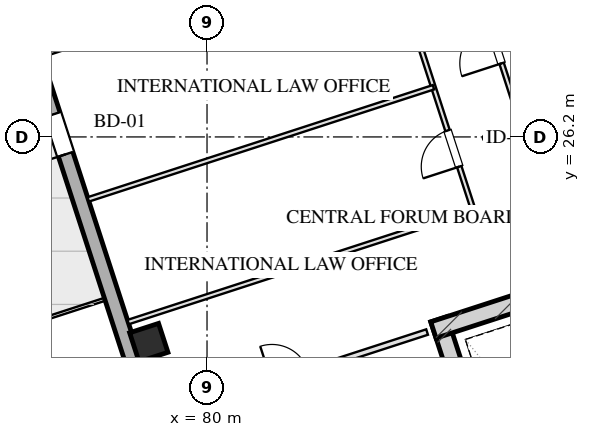
"""IFC4 building model, lengths in metres.
Left out: names, types, materials, properties, quantities, classifications, styles, units other than length and angle.
Written with IfcOpenShell. Run it as: python <this file> out.ifc"""

import sys

from ifc_helpers import new_model, si_unit, direction, frame, frame_2d, origin, origin_2d, place, context, subcontext, project, spatial, rectangle, hollow_rectangle, extrude, element, fill, save


model = new_model("IFC4")
c1 = context("Model", 3, precision=1e-05, world=origin(), true_north=direction((0.0, 1.0)))
c2 = subcontext(c1, "Body", "Model", "MODEL_VIEW")
j1 = project(units=[si_unit("LENGTHUNIT", "METRE"), si_unit("PLANEANGLEUNIT", "RADIAN")], contexts=[c1])
p1 = place(None, origin())
s1 = spatial("IfcSite", under=j1, at=p1, CompositionType="ELEMENT")
p2 = place(p1, origin())
s2 = spatial("IfcBuilding", under=s1, at=p2, CompositionType="ELEMENT")
p3 = place(p2, frame((0.0, 0.0, 188.6)))
s3 = spatial("IfcBuildingStorey", under=s2, at=p3, CompositionType="ELEMENT", Elevation=188.6)
p4 = place(p3, frame((86.102, 21.404, 0.0), z_axis=(0.0, 0.0, 1.0), x_axis=(0.309035778627, -0.951050412717, 0.0)))
e1 = element("IfcWall", 1, at=p4, inside=s3, PredefinedType="SHEAR", context=c2, shape_type="SweptSolid", body=[
    extrude(rectangle(XDim=9.33, YDim=0.45, at=frame_2d((4.665, 0.0))), origin(), (0.0, 0.0, 1.0), 3.45),
])
p5 = place(p3, frame((85.957, 21.12, 0.0), z_axis=(0.0, 0.0, 1.0), x_axis=(0.951064796122, 0.308991510526, 0.0)))
e2 = element("IfcWall", 2, at=p5, inside=s3, PredefinedType="SHEAR", context=c2, shape_type="SweptSolid", body=[
    extrude(rectangle(XDim=4.145, YDim=0.45, at=frame_2d((2.073, 0.0))), origin(), (0.0, 0.0, 1.0), 3.45),
])
p6 = place(p3, frame((78.468, 20.79, 0.0), z_axis=(0.0, 0.0, 1.0), x_axis=(0.951056516295, 0.309016994375, 0.0)))
e3 = element("IfcColumn", 3, at=p6, inside=s3, PredefinedType="COLUMN", context=c2, shape_type="SweptSolid", body=[
    extrude(hollow_rectangle(XDim=0.8, YDim=0.8, WallThickness=0.028, at=origin_2d()), origin(), (0.0, 0.0, 1.0), 3.451),
])
p7 = place(p3, frame((81.776, 8.827, 0.0), z_axis=(0.0, 0.0, 1.0), x_axis=(-0.309014228706, 0.951057414911, 0.0)))
e4 = element("IfcWall", 4, at=p7, inside=s3, PredefinedType="SOLIDWALL", context=c2, shape_type="SweptSolid", body=[
    extrude(rectangle(XDim=42.8, YDim=0.4, at=frame_2d((21.4, 0.0))), origin(), (0.0, 0.0, 1.0), 2.61),
])
p8 = place(p7, frame((22.95, 0.0, 0.75)))
e5 = element("IfcOpeningElement", 5, at=p8, cuts=e4, PredefinedType="OPENING", context=c2, shape_type="SweptSolid", body=[
    extrude(rectangle(XDim=2.1, YDim=1.46, at=frame_2d((1.05, 0.73))), frame((0.0, 0.21, 0.0), z_axis=(0.0, -1.0, 0.0), x_axis=(1.0, 0.0, 0.0)), (0.0, 0.0, 1.0), 0.42),
])
p9 = place(p7, frame((26.75, 0.0, 0.75)))
e6 = element("IfcOpeningElement", 6, at=p9, cuts=e4, PredefinedType="OPENING", context=c2, shape_type="SweptSolid", body=[
    extrude(rectangle(XDim=2.1, YDim=1.46, at=frame_2d((1.05, 0.73))), frame((0.0, 0.21, 0.0), z_axis=(0.0, -1.0, 0.0), x_axis=(1.0, 0.0, 0.0)), (0.0, 0.0, 1.0), 0.42),
])
p10 = place(p7, frame((17.787, 0.0, 0.0)))
e7 = element("IfcOpeningElement", 7, at=p10, cuts=e4, PredefinedType="OPENING", context=c2, shape_type="SweptSolid", body=[
    extrude(rectangle(XDim=1.1, YDim=2.15, at=frame_2d((0.55, 1.075))), frame((0.0, 0.21, 0.0), z_axis=(0.0, -1.0, 0.0), x_axis=(1.0, 0.0, 0.0)), (0.0, 0.0, 1.0), 0.42),
])
p11 = place(p3, frame((78.753, 18.78, 0.0), z_axis=(0.0, 0.0, 1.0), x_axis=(0.951060977215, 0.309003264738, 0.0)))
e8 = element("IfcWall", 8, at=p11, inside=s3, PredefinedType="PARTITIONING", context=c2, shape_type="SweptSolid", body=[
    extrude(rectangle(XDim=7.4, YDim=0.15, at=frame_2d((3.7, 0.0))), origin(), (0.0, 0.0, 1.0), 3.175),
])
p12 = place(p11, frame((3.108, 0.0, 0.0)))
e9 = element("IfcOpeningElement", 9, at=p12, cuts=e8, PredefinedType="OPENING", context=c2, shape_type="SweptSolid", body=[
    extrude(rectangle(XDim=1.0, YDim=2.05, at=frame_2d((0.5, 1.025))), frame((0.0, 0.085, 0.0), z_axis=(0.0, -1.0, 0.0), x_axis=(1.0, 0.0, 0.0)), (0.0, 0.0, 1.0), 0.17),
])
p13 = place(p3, frame((77.925, 21.328, 0.0), z_axis=(0.0, 0.0, 1.0), x_axis=(0.951053980838, 0.309024797601, 0.0)))
e10 = element("IfcWall", 10, at=p13, inside=s3, PredefinedType="PARTITIONING", context=c2, shape_type="SweptSolid", body=[
    extrude(rectangle(XDim=9.55, YDim=0.12, at=frame_2d((4.775, 0.0))), origin(), (0.0, 0.0, 1.0), 3.175),
])
p14 = place(p3, frame((87.007, 24.28, 0.0), z_axis=(0.0, 0.0, 1.0), x_axis=(-0.309022042254, 0.951054876125, 0.0)))
e11 = element("IfcWall", 11, at=p14, inside=s3, PredefinedType="PARTITIONING", context=c2, shape_type="SweptSolid", body=[
    extrude(rectangle(XDim=16.64, YDim=0.12, at=frame_2d((8.32, 0.0))), origin(), (0.0, 0.0, 1.0), 3.175),
])
p15 = place(p14, frame((1.197, 0.0, 0.0)))
e12 = element("IfcOpeningElement", 12, at=p15, cuts=e11, PredefinedType="OPENING", context=c2, shape_type="SweptSolid", body=[
    extrude(rectangle(XDim=1.0, YDim=2.05, at=frame_2d((0.5, 1.025))), frame((0.0, 0.07, 0.0), z_axis=(0.0, -1.0, 0.0), x_axis=(1.0, 0.0, 0.0)), (0.0, 0.0, 1.0), 0.14),
])
p16 = place(p14, frame((4.891, 0.0, 0.0)))
e13 = element("IfcOpeningElement", 13, at=p16, cuts=e11, PredefinedType="OPENING", context=c2, shape_type="SweptSolid", body=[
    extrude(rectangle(XDim=1.0, YDim=2.05, at=frame_2d((0.5, 1.025))), frame((0.0, 0.07, 0.0), z_axis=(0.0, -1.0, 0.0), x_axis=(1.0, 0.0, 0.0)), (0.0, 0.0, 1.0), 0.14),
])
p17 = place(p14, frame((9.354, 0.0, 0.0)))
e14 = element("IfcOpeningElement", 14, at=p17, cuts=e11, PredefinedType="OPENING", context=c2, shape_type="SweptSolid", body=[
    extrude(rectangle(XDim=1.0, YDim=2.05, at=frame_2d((0.5, 1.025))), frame((0.0, 0.07, 0.0), z_axis=(0.0, -1.0, 0.0), x_axis=(1.0, 0.0, 0.0)), (0.0, 0.0, 1.0), 0.14),
])
p18 = place(p14, frame((13.98, 0.0, 0.0)))
e15 = element("IfcOpeningElement", 15, at=p18, cuts=e11, PredefinedType="OPENING", context=c2, shape_type="SweptSolid", body=[
    extrude(rectangle(XDim=1.0, YDim=2.05, at=frame_2d((0.5, 1.025))), frame((0.0, 0.07, 0.0), z_axis=(0.0, -1.0, 0.0), x_axis=(1.0, 0.0, 0.0)), (0.0, 0.0, 1.0), 0.14),
])
p19 = place(p3, frame((88.814, 24.867, 0.0), z_axis=(0.0, 0.0, 1.0), x_axis=(-0.309022042254, 0.951054876125, 0.0)))
e16 = element("IfcWall", 16, at=p19, inside=s3, PredefinedType="PARTITIONING", context=c2, shape_type="SweptSolid", body=[
    extrude(rectangle(XDim=16.64, YDim=0.12, at=frame_2d((8.32, 0.0))), origin(), (0.0, 0.0, 1.0), 3.175),
])
p20 = place(p19, frame((3.438, 0.0, 0.0)))
e17 = element("IfcOpeningElement", 17, at=p20, cuts=e16, PredefinedType="OPENING", context=c2, shape_type="SweptSolid", body=[
    extrude(rectangle(XDim=1.1, YDim=2.05, at=frame_2d((0.55, 1.025))), frame((0.0, 0.07, 0.0), z_axis=(0.0, -1.0, 0.0), x_axis=(1.0, 0.0, 0.0)), (0.0, 0.0, 1.0), 0.14),
])
p21 = place(p19, frame((11.69, 0.0, 0.0)))
e18 = element("IfcOpeningElement", 18, at=p21, cuts=e16, PredefinedType="OPENING", context=c2, shape_type="SweptSolid", body=[
    extrude(rectangle(XDim=1.1, YDim=2.05, at=frame_2d((0.55, 1.025))), frame((0.0, 0.07, 0.0), z_axis=(0.0, -1.0, 0.0), x_axis=(1.0, 0.0, 0.0)), (0.0, 0.0, 1.0), 0.14),
])
p22 = place(p3, frame((76.876, 24.557, 0.0), z_axis=(0.0, 0.0, 1.0), x_axis=(0.951056422073, 0.309017284359, 0.0)))
e19 = element("IfcWall", 19, at=p22, inside=s3, PredefinedType="PARTITIONING", context=c2, shape_type="SweptSolid", body=[
    extrude(rectangle(XDim=9.55, YDim=0.12, at=frame_2d((4.775, 0.0))), origin(), (0.0, 0.0, 1.0), 3.175),
])
p23 = place(p3, frame((75.642, 28.355, 0.0), z_axis=(0.0, 0.0, 1.0), x_axis=(0.951053980838, 0.309024797601, 0.0)))
e20 = element("IfcWall", 20, at=p23, inside=s3, PredefinedType="PARTITIONING", context=c2, shape_type="SweptSolid", body=[
    extrude(rectangle(XDim=9.55, YDim=0.12, at=frame_2d((4.775, 0.0))), origin(), (0.0, 0.0, 1.0), 3.175),
])
p24 = place(p10, origin())
e21 = element("IfcDoor", 21, at=p24, inside=s3, OperationType="SINGLE_SWING_LEFT", PredefinedType="DOOR", context=c2, shape_type="SweptSolid", body=[
    extrude(rectangle(XDim=1.1, YDim=2.15, at=frame_2d((0.55, 1.075))), frame((0.0, 0.025, 0.0), z_axis=(0.0, -1.0, 0.0), x_axis=(1.0, 0.0, 0.0)), (0.0, 0.0, 1.0), 0.05),
])
fill(e7, e21)
p25 = place(p15, origin())
e22 = element("IfcDoor", 22, at=p25, inside=s3, OperationType="SINGLE_SWING_LEFT", PredefinedType="DOOR", context=c2, shape_type="SweptSolid", body=[
    extrude(rectangle(XDim=1.0, YDim=2.05, at=frame_2d((0.5, 1.025))), frame((0.0, 0.025, 0.0), z_axis=(0.0, -1.0, 0.0), x_axis=(1.0, 0.0, 0.0)), (0.0, 0.0, 1.0), 0.05),
])
fill(e12, e22)
p26 = place(p20, origin())
e23 = element("IfcDoor", 23, at=p26, inside=s3, OperationType="SINGLE_SWING_LEFT", PredefinedType="DOOR", context=c2, shape_type="SweptSolid", body=[
    extrude(rectangle(XDim=1.1, YDim=2.05, at=frame_2d((0.55, 1.025))), frame((0.0, 0.025, 0.0), z_axis=(0.0, -1.0, 0.0), x_axis=(1.0, 0.0, 0.0)), (0.0, 0.0, 1.0), 0.05),
])
fill(e17, e23)
save(model, sys.argv[1])
